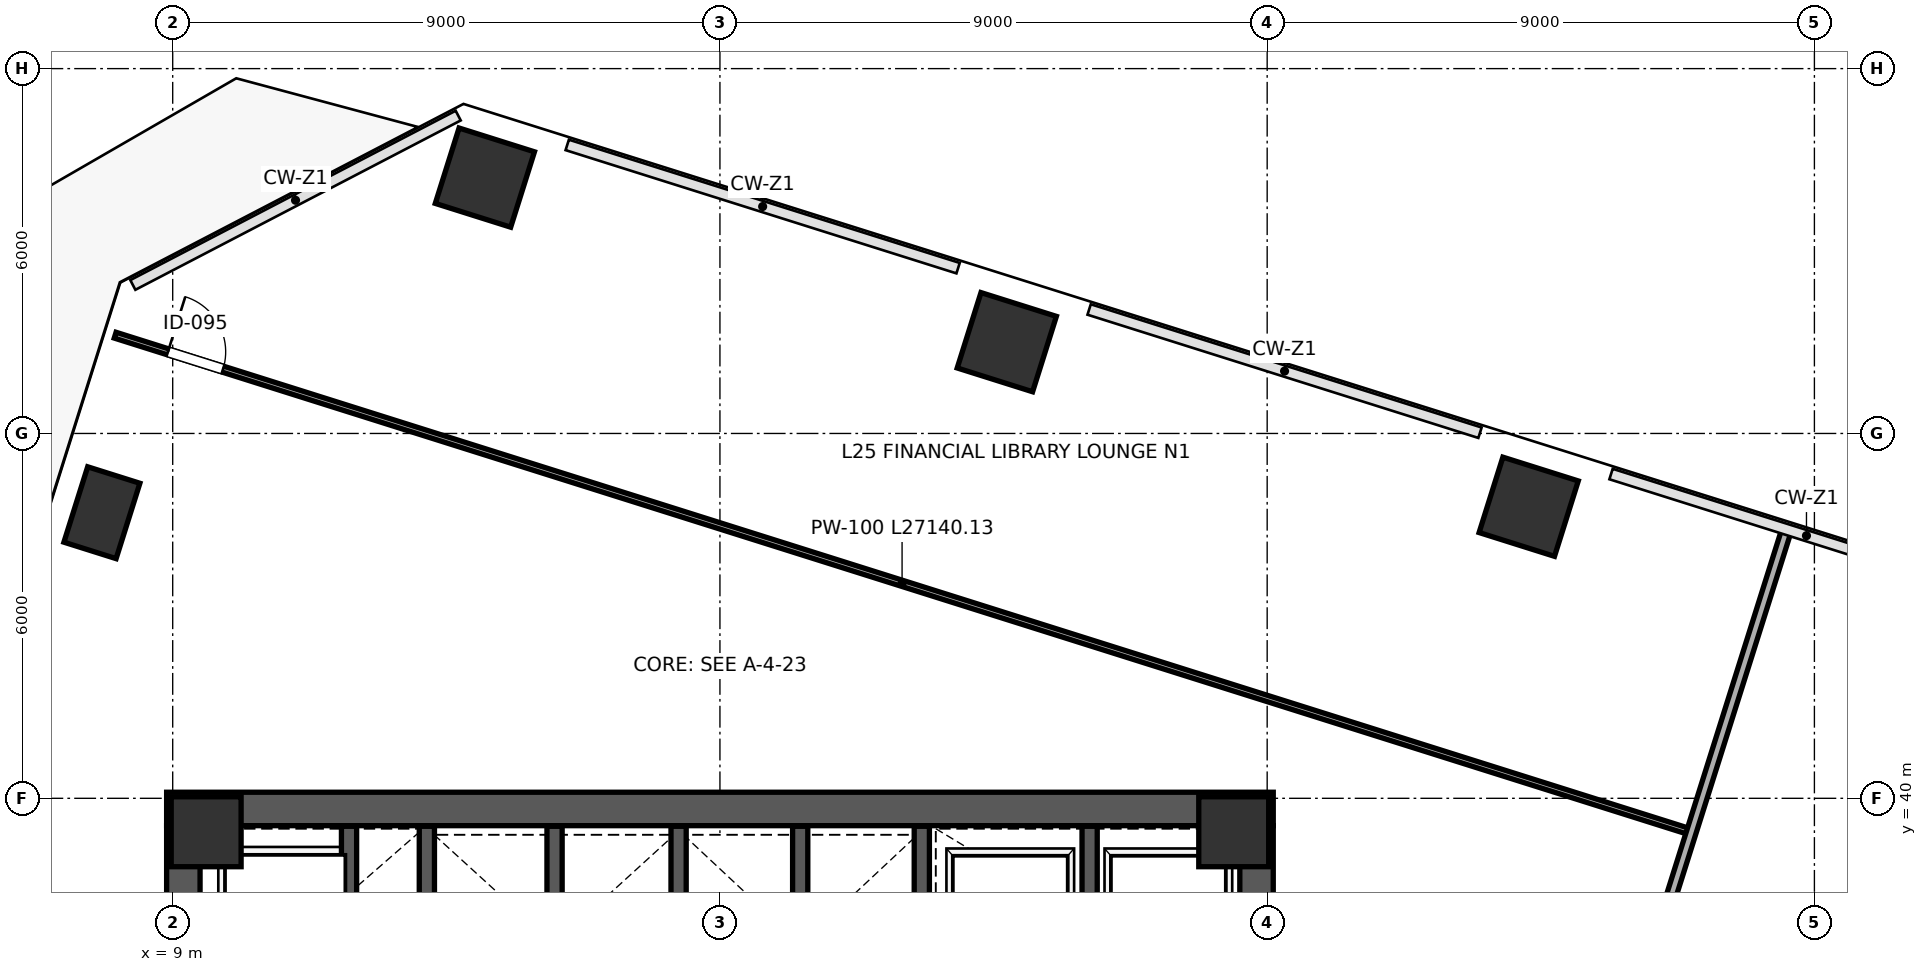
"""IFC4 building model, lengths in metres.
Left out: names, types, materials, properties, quantities, classifications, styles, units other than length and angle.
Written with IfcOpenShell. Run it as: python <this file> out.ifc"""

import sys

from ifc_helpers import new_model, si_unit, direction, frame, frame_2d, origin, origin_2d, place, context, subcontext, project, spatial, rectangle, extrude, source, transform, mapped, element, fill, save


model = new_model("IFC4")
c1 = context("Model", 3, precision=1e-05, world=origin(), true_north=direction((0.0, 1.0)))
c2 = subcontext(c1, "Body", "Model", "MODEL_VIEW")
j1 = project(units=[si_unit("LENGTHUNIT", "METRE"), si_unit("PLANEANGLEUNIT", "RADIAN")], contexts=[c1])
p1 = place(None, origin())
s1 = spatial("IfcSite", under=j1, at=p1, CompositionType="ELEMENT")
p2 = place(p1, origin())
s2 = spatial("IfcBuilding", under=s1, at=p2, CompositionType="ELEMENT")
p3 = place(p2, frame((0.0, 0.0, 112.6)))
s3 = spatial("IfcBuildingStorey", under=s2, at=p3, CompositionType="ELEMENT", Elevation=112.6)
m1 = source(origin(), c2, "Body", "SweptSolid", [
    extrude(rectangle(XDim=1.15, YDim=1.15, at=origin_2d()), origin(), (0.0, 0.0, 1.0), 4.198),
])
for number, where, z_axis, x_axis in (
    (1, (9.55, 39.45, 0.001), (0.0, 0.0, 1.0), (1.0, 0.0, 0.0)),
    (2, (26.45, 39.45, 0.001), (0.0, 0.0, 1.0), (1.0, 0.0, 0.0)),
):
    element("IfcColumn", number, at=place(p3, frame(where, z_axis=z_axis, x_axis=x_axis)), inside=s3, PredefinedType="COLUMN", context=c2, shape_type="MappedRepresentation", body=[
        mapped(m1, transform((0.0, 0.0, 0.0), scale=1.0)),
    ])
m2 = source(origin(), c2, "Body", "SweptSolid", [
    extrude(rectangle(XDim=1.3, YDim=1.3, at=origin_2d()), origin(), (0.0, 0.0, 1.0), 4.198),
])
for number, where, z_axis, x_axis in (
    (3, (14.134, 50.208, 0.001), (0.0, 0.0, 1.0), (-0.954, 0.301, 0.0)),
    (4, (22.718, 47.501, 0.001), (0.0, 0.0, 1.0), (-0.954, 0.301, 0.0)),
    (5, (31.301, 44.795, 0.001), (0.0, 0.0, 1.0), (-0.954, 0.301, 0.0)),
):
    element("IfcColumn", number, at=place(p3, frame(where, z_axis=z_axis, x_axis=x_axis)), inside=s3, PredefinedType="COLUMN", context=c2, shape_type="MappedRepresentation", body=[
        mapped(m2, transform((0.0, 0.0, 0.0), scale=1.0)),
    ])
m3 = source(origin(), c2, "Body", "SweptSolid", [
    extrude(rectangle(XDim=0.9, YDim=1.3, at=origin_2d()), origin(), (0.0, 0.0, 1.0), 4.198),
])
p4 = place(p3, frame((7.835, 44.697, 0.001), z_axis=(0.0, 0.0, 1.0), x_axis=(-0.953716950748, 0.300705799504, 0.0)))
e6 = element("IfcColumn", 6, at=p4, inside=s3, PredefinedType="PILASTER", context=c2, shape_type="MappedRepresentation", body=[
    mapped(m3, transform((0.0, 0.0, 0.0), scale=1.0)),
])
p5 = place(p3, frame((9.175, 24.45, 0.0), z_axis=(0.0, 0.0, 1.0), x_axis=(0.0, 1.0, 0.0)))
e7 = element("IfcWall", 7, at=p5, inside=s3, PredefinedType="SHEAR", context=c2, shape_type="SweptSolid", body=[
    extrude(rectangle(XDim=15.1, YDim=0.55, at=frame_2d((7.55, 0.0))), origin(), (0.0, 0.0, 1.0), 3.96),
])
p6 = place(p3, frame((26.825, 24.45, 0.0), z_axis=(0.0, 0.0, 1.0), x_axis=(0.0, 1.0, 0.0)))
e8 = element("IfcWall", 8, at=p6, inside=s3, PredefinedType="SHEAR", context=c2, shape_type="SweptSolid", body=[
    extrude(rectangle(XDim=15.1, YDim=0.55, at=frame_2d((7.55, 0.0))), origin(), (0.0, 0.0, 1.0), 3.96),
])
p7 = place(p6, frame((8.6, 0.0, 0.0)))
e9 = element("IfcOpeningElement", 9, at=p7, cuts=e8, PredefinedType="OPENING", context=c2, shape_type="SweptSolid", body=[
    extrude(rectangle(XDim=1.15, YDim=2.2, at=frame_2d((0.575, 1.1))), frame((0.0, 0.285, 0.0), z_axis=(0.0, -1.0, 0.0), x_axis=(1.0, 0.0, 0.0)), (0.0, 0.0, 1.0), 0.57),
])
p8 = place(p3, frame((8.9, 39.825, 0.0), z_axis=(0.0, 0.0, 1.0), x_axis=(1.0, 0.0, 0.0)))
e10 = element("IfcWall", 10, at=p8, inside=s3, PredefinedType="SHEAR", context=c2, shape_type="SweptSolid", body=[
    extrude(rectangle(XDim=18.2, YDim=0.55, at=frame_2d((9.1, 0.0))), origin(), (0.0, 0.0, 1.0), 3.96),
])
p9 = place(p3, frame((21.32, 32.12, 0.0), z_axis=(0.0, 0.0, 1.0), x_axis=(0.0, 1.0, 0.0)))
e11 = element("IfcWall", 11, at=p9, inside=s3, PredefinedType="SHEAR", context=c2, shape_type="SweptSolid", body=[
    extrude(rectangle(XDim=7.42, YDim=0.25, at=frame_2d((3.71, 0.0))), origin(), (0.0, 0.0, 1.0), 3.96),
])
p10 = place(p9, frame((1.4, 0.0, 0.0)))
e12 = element("IfcOpeningElement", 12, at=p10, cuts=e11, PredefinedType="OPENING", context=c2, shape_type="SweptSolid", body=[
    extrude(rectangle(XDim=1.15, YDim=2.2, at=frame_2d((0.575, 1.1))), frame((0.0, 0.135, 0.0), z_axis=(0.0, -1.0, 0.0), x_axis=(1.0, 0.0, 0.0)), (0.0, 0.0, 1.0), 0.27),
])
p11 = place(p3, frame((11.9, 36.31, 0.0), z_axis=(0.0, 0.0, 1.0), x_axis=(0.0, 1.0, 0.0)))
e13 = element("IfcWall", 13, at=p11, inside=s3, PredefinedType="SHEAR", context=c2, shape_type="SweptSolid", body=[
    extrude(rectangle(XDim=3.23, YDim=0.25, at=frame_2d((1.615, 0.0))), origin(), (0.0, 0.0, 1.0), 3.96),
])
p12 = place(p3, frame((24.08, 36.48, 0.0), z_axis=(0.0, 0.0, 1.0), x_axis=(0.0, 1.0, 0.0)))
e14 = element("IfcWall", 14, at=p12, inside=s3, PredefinedType="SHEAR", context=c2, shape_type="SweptSolid", body=[
    extrude(rectangle(XDim=3.06, YDim=0.25, at=frame_2d((1.53, 0.0))), origin(), (0.0, 0.0, 1.0), 3.96),
])
for number, where, z_axis, x_axis in (
    (15, (13.18, 35.81, 0.0), (0.0, 0.0, 1.0), (0.0, 1.0, 0.0)),
    (16, (15.28, 35.81, 0.0), (0.0, 0.0, 1.0), (0.0, 1.0, 0.0)),
    (17, (17.32, 35.81, 0.0), (0.0, 0.0, 1.0), (0.0, 1.0, 0.0)),
    (18, (19.32, 35.81, 0.0), (0.0, 0.0, 1.0), (0.0, 1.0, 0.0)),
):
    element("IfcWall", number, at=place(p3, frame(where, z_axis=z_axis, x_axis=x_axis)), inside=s3, PredefinedType="SHEAR", context=c2, shape_type="SweptSolid", body=[
        extrude(rectangle(XDim=3.73, YDim=0.25, at=frame_2d((1.865, 0.0))), origin(), (0.0, 0.0, 1.0), 3.96),
    ])
p13 = place(p3, frame((8.053, 47.616, 0.0), z_axis=(0.0, 0.0, 1.0), x_axis=(0.953717706363, -0.300703402989, 0.0)))
e19 = element("IfcWall", 19, at=p13, inside=s3, PredefinedType="PARTITIONING", context=c2, shape_type="SweptSolid", body=[
    extrude(rectangle(XDim=27.14, YDim=0.1, at=frame_2d((13.57, 0.0))), origin(), (0.0, 0.0, 1.0), 3.96),
])
p14 = place(p13, frame((0.91, 0.0, 0.0)))
e20 = element("IfcOpeningElement", 20, at=p14, cuts=e19, PredefinedType="OPENING", context=c2, shape_type="SweptSolid", body=[
    extrude(rectangle(XDim=0.95, YDim=2.15, at=frame_2d((0.475, 1.075))), frame((0.0, 0.06, 0.0), z_axis=(0.0, -1.0, 0.0), x_axis=(1.0, 0.0, 0.0)), (0.0, 0.0, 1.0), 0.12),
])
p15 = place(p3, frame((29.444, 25.07, 0.0), z_axis=(0.0, 0.0, 1.0), x_axis=(0.300708769024, 0.953716014457, 0.0)))
e21 = element("IfcWall", 21, at=p15, inside=s3, PredefinedType="PARTITIONING", context=c2, shape_type="SweptSolid", body=[
    extrude(rectangle(XDim=20.24, YDim=0.16, at=frame_2d((10.12, 0.0))), origin(), (0.0, 0.0, 1.0), 3.095),
])
m4 = source(origin(), c2, "Body", "SweptSolid", [
    extrude(rectangle(XDim=0.95, YDim=2.15, at=frame_2d((0.475, 1.075))), frame((0.0, 0.025, 0.0), z_axis=(0.0, -1.0, 0.0), x_axis=(1.0, 0.0, 0.0)), (0.0, 0.0, 1.0), 0.05),
])
p16 = place(p14, origin())
e22 = element("IfcDoor", 22, at=p16, inside=s3, OperationType="SINGLE_SWING_LEFT", PredefinedType="DOOR", context=c2, shape_type="MappedRepresentation", body=[
    mapped(m4, transform((0.0, 0.0, 0.0), scale=1.0)),
])
fill(e20, e22)
save(model, sys.argv[1])
